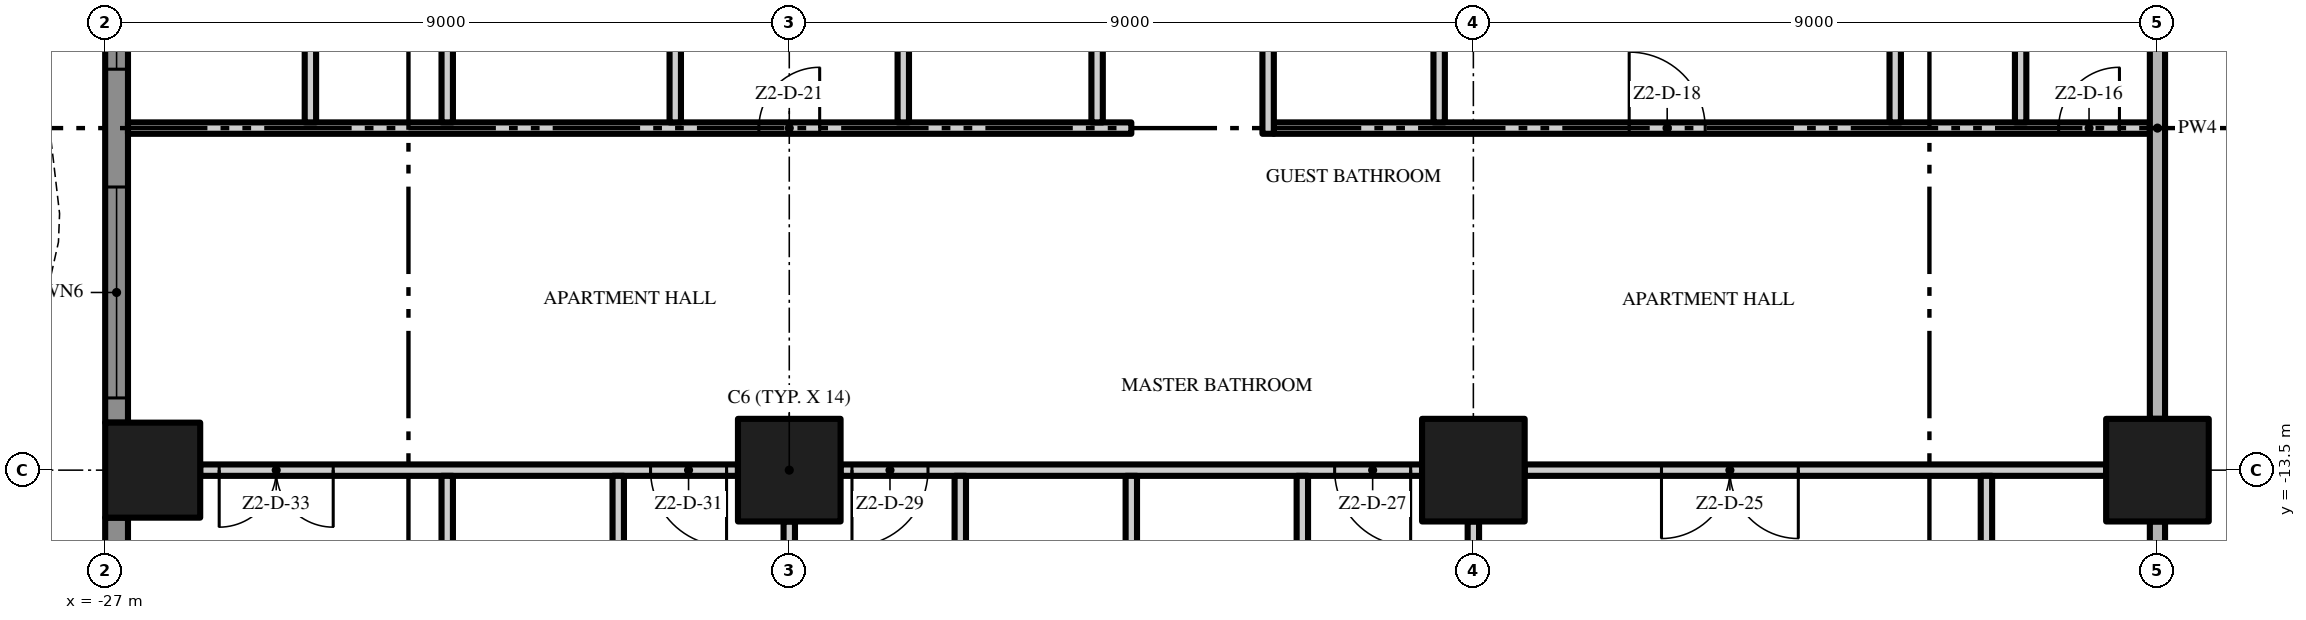
"""IFC4 building model, lengths in metres.
Left out: names, types, materials, properties, quantities, classifications, styles, units other than length and angle.
Written with IfcOpenShell. Run it as: python <this file> out.ifc"""

import sys

from ifc_helpers import new_model, si_unit, direction, frame, frame_2d, origin, origin_2d, place, context, subcontext, project, spatial, polyline, rectangle, outline, extrude, element, fill, save


model = new_model("IFC4")
c1 = context("Model", 3, precision=1e-05, world=origin(), true_north=direction((0.0, 1.0)))
c2 = subcontext(c1, "Body", "Model", "MODEL_VIEW")
j1 = project(units=[si_unit("LENGTHUNIT", "METRE"), si_unit("PLANEANGLEUNIT", "RADIAN")], contexts=[c1])
p1 = place(None, origin())
s1 = spatial("IfcSite", under=j1, at=p1, CompositionType="ELEMENT")
p2 = place(p1, origin())
s2 = spatial("IfcBuilding", under=s1, at=p2, CompositionType="ELEMENT")
p3 = place(p2, frame((0.0, 0.0, 103.6)))
s3 = spatial("IfcBuildingStorey", under=s2, at=p3, CompositionType="ELEMENT", Elevation=103.6)
p4 = place(p3, frame((-18.0, -13.5, 0.0), z_axis=(0.0, 0.0, 1.0), x_axis=(1.0, 0.0, 0.0)))
e1 = element("IfcColumn", 1, at=p4, inside=s3, PredefinedType="COLUMN", context=c2, shape_type="SweptSolid", body=[
    extrude(rectangle(XDim=1.35, YDim=1.35, at=origin_2d()), origin(), (0.0, 0.0, 1.0), 3.5),
])
p5 = place(p3, frame((-26.375, -13.5, 0.0), z_axis=(0.0, 0.0, 1.0), x_axis=(1.0, 0.0, 0.0)))
e2 = element("IfcColumn", 2, at=p5, inside=s3, PredefinedType="COLUMN", context=c2, shape_type="SweptSolid", body=[
    extrude(rectangle(XDim=1.25, YDim=1.25, at=origin_2d()), origin(), (0.0, 0.0, 1.0), 3.5),
])
for number, where, z_axis, x_axis in (
    (3, (-9.0, -13.5, 0.0), (0.0, 0.0, 1.0), (1.0, 0.0, 0.0)),
    (4, (0.0, -13.5, 0.0), (0.0, 0.0, 1.0), (1.0, 0.0, 0.0)),
):
    element("IfcColumn", number, at=place(p3, frame(where, z_axis=z_axis, x_axis=x_axis)), inside=s3, PredefinedType="COLUMN", context=c2, shape_type="SweptSolid", body=[
        extrude(rectangle(XDim=1.35, YDim=1.35, at=origin_2d()), origin(), (0.0, 0.0, 1.0), 3.5),
    ])
p6 = place(p3, frame((-26.85, -12.875, 0.0), z_axis=(0.0, 0.0, 1.0), x_axis=(0.0, 1.0, 0.0)))
e5 = element("IfcWall", 5, at=p6, inside=s3, PredefinedType="SOLIDWALL", context=c2, shape_type="SweptSolid", body=[
    extrude(rectangle(XDim=7.75, YDim=0.3, at=frame_2d((3.875, 0.0))), origin(), (0.0, 0.0, 1.0), 3.5),
])
p7 = place(p6, frame((4.65, 0.0, 0.45)))
e6 = element("IfcOpeningElement", 6, at=p7, cuts=e5, PredefinedType="OPENING", context=c2, shape_type="SweptSolid", body=[
    extrude(rectangle(XDim=2.775, YDim=2.65, at=frame_2d((1.387, 1.325))), frame((0.0, 0.16, 0.0), z_axis=(0.0, -1.0, 0.0), x_axis=(1.0, 0.0, 0.0)), (0.0, 0.0, 1.0), 0.32),
])
p8 = place(p6, frame((0.325, 0.0, 0.45)))
e7 = element("IfcOpeningElement", 7, at=p8, cuts=e5, PredefinedType="OPENING", context=c2, shape_type="SweptSolid", body=[
    extrude(rectangle(XDim=2.775, YDim=2.65, at=frame_2d((1.387, 1.325))), frame((0.0, 0.16, 0.0), z_axis=(0.0, -1.0, 0.0), x_axis=(1.0, 0.0, 0.0)), (0.0, 0.0, 1.0), 0.32),
])
p9 = place(p3, frame((-26.85, -18.0, 0.0), z_axis=(0.0, 0.0, 1.0), x_axis=(0.0, 1.0, 0.0)))
e8 = element("IfcWall", 8, at=p9, inside=s3, PredefinedType="SOLIDWALL", context=c2, shape_type="SweptSolid", body=[
    extrude(rectangle(XDim=3.875, YDim=0.3, at=frame_2d((1.938, 0.0))), origin(), (0.0, 0.0, 1.0), 3.5),
])
p10 = place(p9, frame((0.775, 0.0, 0.0)))
e9 = element("IfcOpeningElement", 9, at=p10, cuts=e8, PredefinedType="OPENING", context=c2, shape_type="SweptSolid", body=[
    extrude(rectangle(XDim=2.775, YDim=2.4, at=frame_2d((1.387, 1.2))), frame((0.0, 0.16, 0.0), z_axis=(0.0, -1.0, 0.0), x_axis=(1.0, 0.0, 0.0)), (0.0, 0.0, 1.0), 0.32),
])
p11 = place(p3, origin())
e10 = element("IfcWall", 10, at=p11, inside=s3, PredefinedType="USERDEFINED", context=c2, shape_type="SweptSolid", body=[
    extrude(outline(polyline([(-27.951, 18.0), (-28.612, 16.5), (-29.345, 15.0), (-29.869, 13.5), (-30.0, 12.375), (-29.985, 12.0), (-29.649, 10.5), (-28.988, 9.0), (-28.255, 7.5), (-27.731, 6.0), (-27.6, 4.875), (-27.615, 4.5), (-27.951, 3.0), (-28.612, 1.5), (-29.345, 0.0), (-29.869, -1.5), (-30.0, -2.625), (-29.985, -3.0), (-29.649, -4.5), (-28.988, -6.0), (-28.255, -7.5), (-27.731, -9.0), (-27.6, -10.125), (-27.615, -10.5), (-27.951, -12.0), (-28.612, -13.5), (-29.345, -15.0), (-29.869, -16.5), (-30.0, -17.625), (-29.985, -18.0), (-29.735, -17.99), (-29.749, -17.635), (-29.624, -16.556), (-29.114, -15.096), (-28.385, -13.605), (-27.713, -12.079), (-27.366, -10.533), (-27.349, -10.115), (-27.486, -8.944), (-28.024, -7.404), (-28.761, -5.895), (-29.41, -4.421), (-29.736, -2.967), (-29.749, -2.635), (-29.624, -1.556), (-29.114, -0.096), (-28.385, 1.395), (-27.713, 2.921), (-27.366, 4.467), (-27.349, 4.885), (-27.486, 6.056), (-28.024, 7.596), (-28.761, 9.105), (-29.41, 10.579), (-29.736, 12.033), (-29.749, 12.365), (-29.624, 13.444), (-29.114, 14.904), (-28.385, 16.395), (-27.723, 17.899), (-27.951, 18.0)])), origin(), (0.0, 0.0, 1.0), 0.9),
])
p12 = place(p3, frame((-18.675, -13.5, 0.0), z_axis=(0.0, 0.0, 1.0), x_axis=(-1.0, 0.0, 0.0)))
e11 = element("IfcWall", 11, at=p12, inside=s3, PredefinedType="PARTITIONING", context=c2, shape_type="SweptSolid", body=[
    extrude(rectangle(XDim=7.075, YDim=0.15, at=frame_2d((3.538, 0.0))), origin(), (0.0, 0.0, 1.0), 3.5),
])
p13 = place(p12, frame((0.15, 0.0, 0.0)))
e12 = element("IfcOpeningElement", 12, at=p13, cuts=e11, PredefinedType="OPENING", context=c2, shape_type="SweptSolid", body=[
    extrude(rectangle(XDim=1.0, YDim=2.4, at=frame_2d((0.5, 1.2))), frame((0.0, 0.085, 0.0), z_axis=(0.0, -1.0, 0.0), x_axis=(1.0, 0.0, 0.0)), (0.0, 0.0, 1.0), 0.17),
])
p14 = place(p12, frame((5.325, 0.0, 0.0)))
e13 = element("IfcOpeningElement", 13, at=p14, cuts=e11, PredefinedType="OPENING", context=c2, shape_type="SweptSolid", body=[
    extrude(rectangle(XDim=1.5, YDim=2.4, at=frame_2d((0.75, 1.2))), frame((0.0, 0.085, 0.0), z_axis=(0.0, -1.0, 0.0), x_axis=(1.0, 0.0, 0.0)), (0.0, 0.0, 1.0), 0.17),
])
p15 = place(p3, frame((-9.675, -13.5, 0.0), z_axis=(0.0, 0.0, 1.0), x_axis=(-1.0, 0.0, 0.0)))
e14 = element("IfcWall", 14, at=p15, inside=s3, PredefinedType="PARTITIONING", context=c2, shape_type="SweptSolid", body=[
    extrude(rectangle(XDim=7.65, YDim=0.15, at=frame_2d((3.825, 0.0))), origin(), (0.0, 0.0, 1.0), 3.5),
])
p16 = place(p15, frame((0.15, 0.0, 0.0)))
e15 = element("IfcOpeningElement", 15, at=p16, cuts=e14, PredefinedType="OPENING", context=c2, shape_type="SweptSolid", body=[
    extrude(rectangle(XDim=1.0, YDim=2.4, at=frame_2d((0.5, 1.2))), frame((0.0, 0.085, 0.0), z_axis=(0.0, -1.0, 0.0), x_axis=(1.0, 0.0, 0.0)), (0.0, 0.0, 1.0), 0.17),
])
p17 = place(p15, frame((6.5, 0.0, 0.0)))
e16 = element("IfcOpeningElement", 16, at=p17, cuts=e14, PredefinedType="OPENING", context=c2, shape_type="SweptSolid", body=[
    extrude(rectangle(XDim=1.0, YDim=2.4, at=frame_2d((0.5, 1.2))), frame((0.0, 0.085, 0.0), z_axis=(0.0, -1.0, 0.0), x_axis=(1.0, 0.0, 0.0)), (0.0, 0.0, 1.0), 0.17),
])
p18 = place(p3, frame((-0.675, -13.5, 0.0), z_axis=(0.0, 0.0, 1.0), x_axis=(-1.0, 0.0, 0.0)))
e17 = element("IfcWall", 17, at=p18, inside=s3, PredefinedType="PARTITIONING", context=c2, shape_type="SweptSolid", body=[
    extrude(rectangle(XDim=7.65, YDim=0.15, at=frame_2d((3.825, 0.0))), origin(), (0.0, 0.0, 1.0), 3.5),
])
p19 = place(p18, frame((4.05, 0.0, 0.0)))
e18 = element("IfcOpeningElement", 18, at=p19, cuts=e17, PredefinedType="OPENING", context=c2, shape_type="SweptSolid", body=[
    extrude(rectangle(XDim=1.8, YDim=2.4, at=frame_2d((0.9, 1.2))), frame((0.0, 0.085, 0.0), z_axis=(0.0, -1.0, 0.0), x_axis=(1.0, 0.0, 0.0)), (0.0, 0.0, 1.0), 0.17),
])
p20 = place(p3, frame((-26.7, -9.0, 0.0), z_axis=(0.0, 0.0, 1.0), x_axis=(1.0, 0.0, 0.0)))
e19 = element("IfcWall", 19, at=p20, inside=s3, PredefinedType="PARTITIONING", context=c2, shape_type="SweptSolid", body=[
    extrude(rectangle(XDim=13.2, YDim=0.15, at=frame_2d((6.6, 0.0))), origin(), (0.0, 0.0, 1.0), 3.5),
])
p21 = place(p20, frame((8.3, 0.0, 0.0)))
e20 = element("IfcOpeningElement", 20, at=p21, cuts=e19, PredefinedType="OPENING", context=c2, shape_type="SweptSolid", body=[
    extrude(rectangle(XDim=0.8, YDim=2.0, at=frame_2d((0.4, 1.0))), frame((0.0, 0.085, 0.0), z_axis=(0.0, -1.0, 0.0), x_axis=(1.0, 0.0, 0.0)), (0.0, 0.0, 1.0), 0.17),
])
p22 = place(p3, frame((-11.625, -9.0, 0.0), z_axis=(0.0, 0.0, 1.0), x_axis=(1.0, 0.0, 0.0)))
e21 = element("IfcWall", 21, at=p22, inside=s3, PredefinedType="PARTITIONING", context=c2, shape_type="SweptSolid", body=[
    extrude(rectangle(XDim=11.525, YDim=0.15, at=frame_2d((5.763, 0.0))), origin(), (0.0, 0.0, 1.0), 3.5),
])
p23 = place(p22, frame((10.325, 0.0, 0.0)))
e22 = element("IfcOpeningElement", 22, at=p23, cuts=e21, PredefinedType="OPENING", context=c2, shape_type="SweptSolid", body=[
    extrude(rectangle(XDim=0.8, YDim=2.0, at=frame_2d((0.4, 1.0))), frame((0.0, 0.085, 0.0), z_axis=(0.0, -1.0, 0.0), x_axis=(1.0, 0.0, 0.0)), (0.0, 0.0, 1.0), 0.17),
])
p24 = place(p22, frame((4.675, 0.0, 0.0)))
e23 = element("IfcOpeningElement", 23, at=p24, cuts=e21, PredefinedType="OPENING", context=c2, shape_type="SweptSolid", body=[
    extrude(rectangle(XDim=1.0, YDim=2.4, at=frame_2d((0.5, 1.2))), frame((0.0, 0.085, 0.0), z_axis=(0.0, -1.0, 0.0), x_axis=(1.0, 0.0, 0.0)), (0.0, 0.0, 1.0), 0.17),
])
p25 = place(p3, frame((-24.3, -8.925, 0.0), z_axis=(0.0, 0.0, 1.0), x_axis=(0.0, 1.0, 0.0)))
e24 = element("IfcWall", 24, at=p25, inside=s3, PredefinedType="PARTITIONING", context=c2, shape_type="SweptSolid", body=[
    extrude(rectangle(XDim=4.35, YDim=0.15, at=frame_2d((2.175, 0.0))), origin(), (0.0, 0.0, 1.0), 3.5),
])
p26 = place(p3, frame((-22.5, -17.375, 0.0), z_axis=(0.0, 0.0, 1.0), x_axis=(0.0, 1.0, 0.0)))
e25 = element("IfcWall", 25, at=p26, inside=s3, PredefinedType="PARTITIONING", context=c2, shape_type="SweptSolid", body=[
    extrude(rectangle(XDim=3.8, YDim=0.15, at=frame_2d((1.9, 0.0))), origin(), (0.0, 0.0, 1.0), 3.5),
])
p27 = place(p3, frame((-22.5, -8.925, 0.0), z_axis=(0.0, 0.0, 1.0), x_axis=(0.0, 1.0, 0.0)))
e26 = element("IfcWall", 26, at=p27, inside=s3, PredefinedType="PARTITIONING", context=c2, shape_type="SweptSolid", body=[
    extrude(rectangle(XDim=4.35, YDim=0.15, at=frame_2d((2.175, 0.0))), origin(), (0.0, 0.0, 1.0), 3.5),
])
p28 = place(p3, frame((-20.25, -16.575, 0.0), z_axis=(0.0, 0.0, 1.0), x_axis=(0.0, 1.0, 0.0)))
e27 = element("IfcWall", 27, at=p28, inside=s3, PredefinedType="PARTITIONING", context=c2, shape_type="SweptSolid", body=[
    extrude(rectangle(XDim=3.0, YDim=0.15, at=frame_2d((1.5, 0.0))), origin(), (0.0, 0.0, 1.0), 3.5),
])
p29 = place(p3, frame((-19.5, -8.925, 0.0), z_axis=(0.0, 0.0, 1.0), x_axis=(0.0, 1.0, 0.0)))
e28 = element("IfcWall", 28, at=p29, inside=s3, PredefinedType="PARTITIONING", context=c2, shape_type="SweptSolid", body=[
    extrude(rectangle(XDim=4.35, YDim=0.15, at=frame_2d((2.175, 0.0))), origin(), (0.0, 0.0, 1.0), 3.5),
])
p30 = place(p3, frame((-18.0, -21.25, 0.0), z_axis=(0.0, 0.0, 1.0), x_axis=(0.0, 1.0, 0.0)))
e29 = element("IfcWall", 29, at=p30, inside=s3, PredefinedType="PARTITIONING", context=c2, shape_type="SweptSolid", body=[
    extrude(rectangle(XDim=7.075, YDim=0.15, at=frame_2d((3.538, 0.0))), origin(), (0.0, 0.0, 1.0), 3.5),
])
p31 = place(p3, frame((-16.5, -8.925, 0.0), z_axis=(0.0, 0.0, 1.0), x_axis=(0.0, 1.0, 0.0)))
e30 = element("IfcWall", 30, at=p31, inside=s3, PredefinedType="PARTITIONING", context=c2, shape_type="SweptSolid", body=[
    extrude(rectangle(XDim=4.35, YDim=0.15, at=frame_2d((2.175, 0.0))), origin(), (0.0, 0.0, 1.0), 3.5),
])
p32 = place(p3, frame((-15.75, -16.575, 0.0), z_axis=(0.0, 0.0, 1.0), x_axis=(0.0, 1.0, 0.0)))
e31 = element("IfcWall", 31, at=p32, inside=s3, PredefinedType="PARTITIONING", context=c2, shape_type="SweptSolid", body=[
    extrude(rectangle(XDim=3.0, YDim=0.15, at=frame_2d((1.5, 0.0))), origin(), (0.0, 0.0, 1.0), 3.5),
])
p33 = place(p3, frame((-13.95, -8.925, 0.0), z_axis=(0.0, 0.0, 1.0), x_axis=(0.0, 1.0, 0.0)))
e32 = element("IfcWall", 32, at=p33, inside=s3, PredefinedType="PARTITIONING", context=c2, shape_type="SweptSolid", body=[
    extrude(rectangle(XDim=4.5, YDim=0.15, at=frame_2d((2.25, 0.0))), origin(), (0.0, 0.0, 1.0), 3.5),
])
p34 = place(p3, frame((-13.5, -22.2, 0.0), z_axis=(0.0, 0.0, 1.0), x_axis=(0.0, 1.0, 0.0)))
e33 = element("IfcWall", 33, at=p34, inside=s3, PredefinedType="PARTITIONING", context=c2, shape_type="SweptSolid", body=[
    extrude(rectangle(XDim=8.625, YDim=0.15, at=frame_2d((4.312, 0.0))), origin(), (0.0, 0.0, 1.0), 3.5),
])
p35 = place(p3, frame((-11.7, -4.425, 0.0), z_axis=(0.0, 0.0, 1.0), x_axis=(0.0, -1.0, 0.0)))
e34 = element("IfcWall", 34, at=p35, inside=s3, PredefinedType="PARTITIONING", context=c2, shape_type="SweptSolid", body=[
    extrude(rectangle(XDim=4.65, YDim=0.15, at=frame_2d((2.325, 0.0))), origin(), (0.0, 0.0, 1.0), 3.5),
])
p36 = place(p35, frame((1.875, 0.0, 0.0)))
e35 = element("IfcOpeningElement", 35, at=p36, cuts=e34, PredefinedType="OPENING", context=c2, shape_type="SweptSolid", body=[
    extrude(rectangle(XDim=0.9, YDim=2.1, at=frame_2d((0.45, 1.05))), frame((0.0, 0.085, 0.0), z_axis=(0.0, -1.0, 0.0), x_axis=(1.0, 0.0, 0.0)), (0.0, 0.0, 1.0), 0.17),
])
p37 = place(p3, frame((-11.25, -16.575, 0.0), z_axis=(0.0, 0.0, 1.0), x_axis=(0.0, 1.0, 0.0)))
e36 = element("IfcWall", 36, at=p37, inside=s3, PredefinedType="PARTITIONING", context=c2, shape_type="SweptSolid", body=[
    extrude(rectangle(XDim=3.0, YDim=0.15, at=frame_2d((1.5, 0.0))), origin(), (0.0, 0.0, 1.0), 3.5),
])
p38 = place(p3, frame((-9.45, -8.925, 0.0), z_axis=(0.0, 0.0, 1.0), x_axis=(0.0, 1.0, 0.0)))
e37 = element("IfcWall", 37, at=p38, inside=s3, PredefinedType="PARTITIONING", context=c2, shape_type="SweptSolid", body=[
    extrude(rectangle(XDim=3.75, YDim=0.15, at=frame_2d((1.875, 0.0))), origin(), (0.0, 0.0, 1.0), 3.5),
])
p39 = place(p3, frame((-9.0, -21.25, 0.0), z_axis=(0.0, 0.0, 1.0), x_axis=(0.0, 1.0, 0.0)))
e38 = element("IfcWall", 38, at=p39, inside=s3, PredefinedType="PARTITIONING", context=c2, shape_type="SweptSolid", body=[
    extrude(rectangle(XDim=7.075, YDim=0.15, at=frame_2d((3.538, 0.0))), origin(), (0.0, 0.0, 1.0), 3.5),
])
p40 = place(p3, frame((-3.45, -8.925, 0.0), z_axis=(0.0, 0.0, 1.0), x_axis=(0.0, 1.0, 0.0)))
e39 = element("IfcWall", 39, at=p40, inside=s3, PredefinedType="PARTITIONING", context=c2, shape_type="SweptSolid", body=[
    extrude(rectangle(XDim=4.35, YDim=0.15, at=frame_2d((2.175, 0.0))), origin(), (0.0, 0.0, 1.0), 3.5),
])
p41 = place(p3, frame((-2.25, -16.575, 0.0), z_axis=(0.0, 0.0, 1.0), x_axis=(0.0, 1.0, 0.0)))
e40 = element("IfcWall", 40, at=p41, inside=s3, PredefinedType="PARTITIONING", context=c2, shape_type="SweptSolid", body=[
    extrude(rectangle(XDim=3.0, YDim=0.15, at=frame_2d((1.5, 0.0))), origin(), (0.0, 0.0, 1.0), 3.5),
])
p42 = place(p3, frame((-1.8, -8.925, 0.0), z_axis=(0.0, 0.0, 1.0), x_axis=(0.0, 1.0, 0.0)))
e41 = element("IfcWall", 41, at=p42, inside=s3, PredefinedType="PARTITIONING", context=c2, shape_type="SweptSolid", body=[
    extrude(rectangle(XDim=4.35, YDim=0.15, at=frame_2d((2.175, 0.0))), origin(), (0.0, 0.0, 1.0), 3.5),
])
p43 = place(p3, frame((0.0, -21.25, 0.0), z_axis=(0.0, 0.0, 1.0), x_axis=(0.0, 1.0, 0.0)))
e42 = element("IfcWall", 42, at=p43, inside=s3, PredefinedType="PARTITIONING", context=c2, shape_type="SweptSolid", body=[
    extrude(rectangle(XDim=7.075, YDim=0.2, at=frame_2d((3.538, 0.0))), origin(), (0.0, 0.0, 1.0), 3.5),
])
p44 = place(p3, frame((0.0, -12.825, 0.0), z_axis=(0.0, 0.0, 1.0), x_axis=(0.0, 1.0, 0.0)))
e43 = element("IfcWall", 43, at=p44, inside=s3, PredefinedType="PARTITIONING", context=c2, shape_type="SweptSolid", body=[
    extrude(rectangle(XDim=7.65, YDim=0.2, at=frame_2d((3.825, 0.0))), origin(), (0.0, 0.0, 1.0), 3.5),
])
p45 = place(p7, origin())
e44 = element("IfcWindow", 44, at=p45, inside=s3, PartitioningType="SINGLE_PANEL", PredefinedType="WINDOW", context=c2, shape_type="SweptSolid", body=[
    extrude(rectangle(XDim=2.775, YDim=2.65, at=frame_2d((1.387, 1.325))), frame((0.0, 0.03, 0.0), z_axis=(0.0, -1.0, 0.0), x_axis=(1.0, 0.0, 0.0)), (0.0, 0.0, 1.0), 0.06),
])
fill(e6, e44)
p46 = place(p8, origin())
e45 = element("IfcWindow", 45, at=p46, inside=s3, PartitioningType="SINGLE_PANEL", PredefinedType="WINDOW", context=c2, shape_type="SweptSolid", body=[
    extrude(rectangle(XDim=2.775, YDim=2.65, at=frame_2d((1.387, 1.325))), frame((0.0, 0.03, 0.0), z_axis=(0.0, -1.0, 0.0), x_axis=(1.0, 0.0, 0.0)), (0.0, 0.0, 1.0), 0.06),
])
fill(e7, e45)
p47 = place(p23, origin())
e46 = element("IfcDoor", 46, at=p47, inside=s3, OperationType="SINGLE_SWING_RIGHT", PredefinedType="DOOR", context=c2, shape_type="SweptSolid", body=[
    extrude(rectangle(XDim=0.8, YDim=2.0, at=frame_2d((0.4, 1.0))), frame((0.0, 0.025, 0.0), z_axis=(0.0, -1.0, 0.0), x_axis=(1.0, 0.0, 0.0)), (0.0, 0.0, 1.0), 0.05),
])
fill(e22, e46)
p48 = place(p24, origin())
e47 = element("IfcDoor", 47, at=p48, inside=s3, OperationType="SINGLE_SWING_LEFT", PredefinedType="DOOR", context=c2, shape_type="SweptSolid", body=[
    extrude(rectangle(XDim=1.0, YDim=2.4, at=frame_2d((0.5, 1.2))), frame((0.0, 0.025, 0.0), z_axis=(0.0, -1.0, 0.0), x_axis=(1.0, 0.0, 0.0)), (0.0, 0.0, 1.0), 0.05),
])
fill(e23, e47)
p49 = place(p21, origin())
e48 = element("IfcDoor", 48, at=p49, inside=s3, OperationType="SINGLE_SWING_RIGHT", PredefinedType="DOOR", context=c2, shape_type="SweptSolid", body=[
    extrude(rectangle(XDim=0.8, YDim=2.0, at=frame_2d((0.4, 1.0))), frame((0.0, 0.025, 0.0), z_axis=(0.0, -1.0, 0.0), x_axis=(1.0, 0.0, 0.0)), (0.0, 0.0, 1.0), 0.05),
])
fill(e20, e48)
p50 = place(p19, origin())
e49 = element("IfcDoor", 49, at=p50, inside=s3, OperationType="DOUBLE_DOOR_SINGLE_SWING", PredefinedType="DOOR", context=c2, shape_type="SweptSolid", body=[
    extrude(rectangle(XDim=1.8, YDim=2.4, at=frame_2d((0.9, 1.2))), frame((0.0, 0.025, 0.0), z_axis=(0.0, -1.0, 0.0), x_axis=(1.0, 0.0, 0.0)), (0.0, 0.0, 1.0), 0.05),
])
fill(e18, e49)
p51 = place(p16, origin())
e50 = element("IfcDoor", 50, at=p51, inside=s3, OperationType="SINGLE_SWING_LEFT", PredefinedType="DOOR", context=c2, shape_type="SweptSolid", body=[
    extrude(rectangle(XDim=1.0, YDim=2.4, at=frame_2d((0.5, 1.2))), frame((0.0, 0.025, 0.0), z_axis=(0.0, -1.0, 0.0), x_axis=(1.0, 0.0, 0.0)), (0.0, 0.0, 1.0), 0.05),
])
fill(e15, e50)
p52 = place(p17, origin())
e51 = element("IfcDoor", 51, at=p52, inside=s3, OperationType="SINGLE_SWING_RIGHT", PredefinedType="DOOR", context=c2, shape_type="SweptSolid", body=[
    extrude(rectangle(XDim=1.0, YDim=2.4, at=frame_2d((0.5, 1.2))), frame((0.0, 0.025, 0.0), z_axis=(0.0, -1.0, 0.0), x_axis=(1.0, 0.0, 0.0)), (0.0, 0.0, 1.0), 0.05),
])
fill(e16, e51)
p53 = place(p13, origin())
e52 = element("IfcDoor", 52, at=p53, inside=s3, OperationType="SINGLE_SWING_LEFT", PredefinedType="DOOR", context=c2, shape_type="SweptSolid", body=[
    extrude(rectangle(XDim=1.0, YDim=2.4, at=frame_2d((0.5, 1.2))), frame((0.0, 0.025, 0.0), z_axis=(0.0, -1.0, 0.0), x_axis=(1.0, 0.0, 0.0)), (0.0, 0.0, 1.0), 0.05),
])
fill(e12, e52)
p54 = place(p14, origin())
e53 = element("IfcDoor", 53, at=p54, inside=s3, OperationType="DOUBLE_DOOR_SINGLE_SWING", PredefinedType="DOOR", context=c2, shape_type="SweptSolid", body=[
    extrude(rectangle(XDim=1.5, YDim=2.4, at=frame_2d((0.75, 1.2))), frame((0.0, 0.025, 0.0), z_axis=(0.0, -1.0, 0.0), x_axis=(1.0, 0.0, 0.0)), (0.0, 0.0, 1.0), 0.05),
])
fill(e13, e53)
save(model, sys.argv[1])
